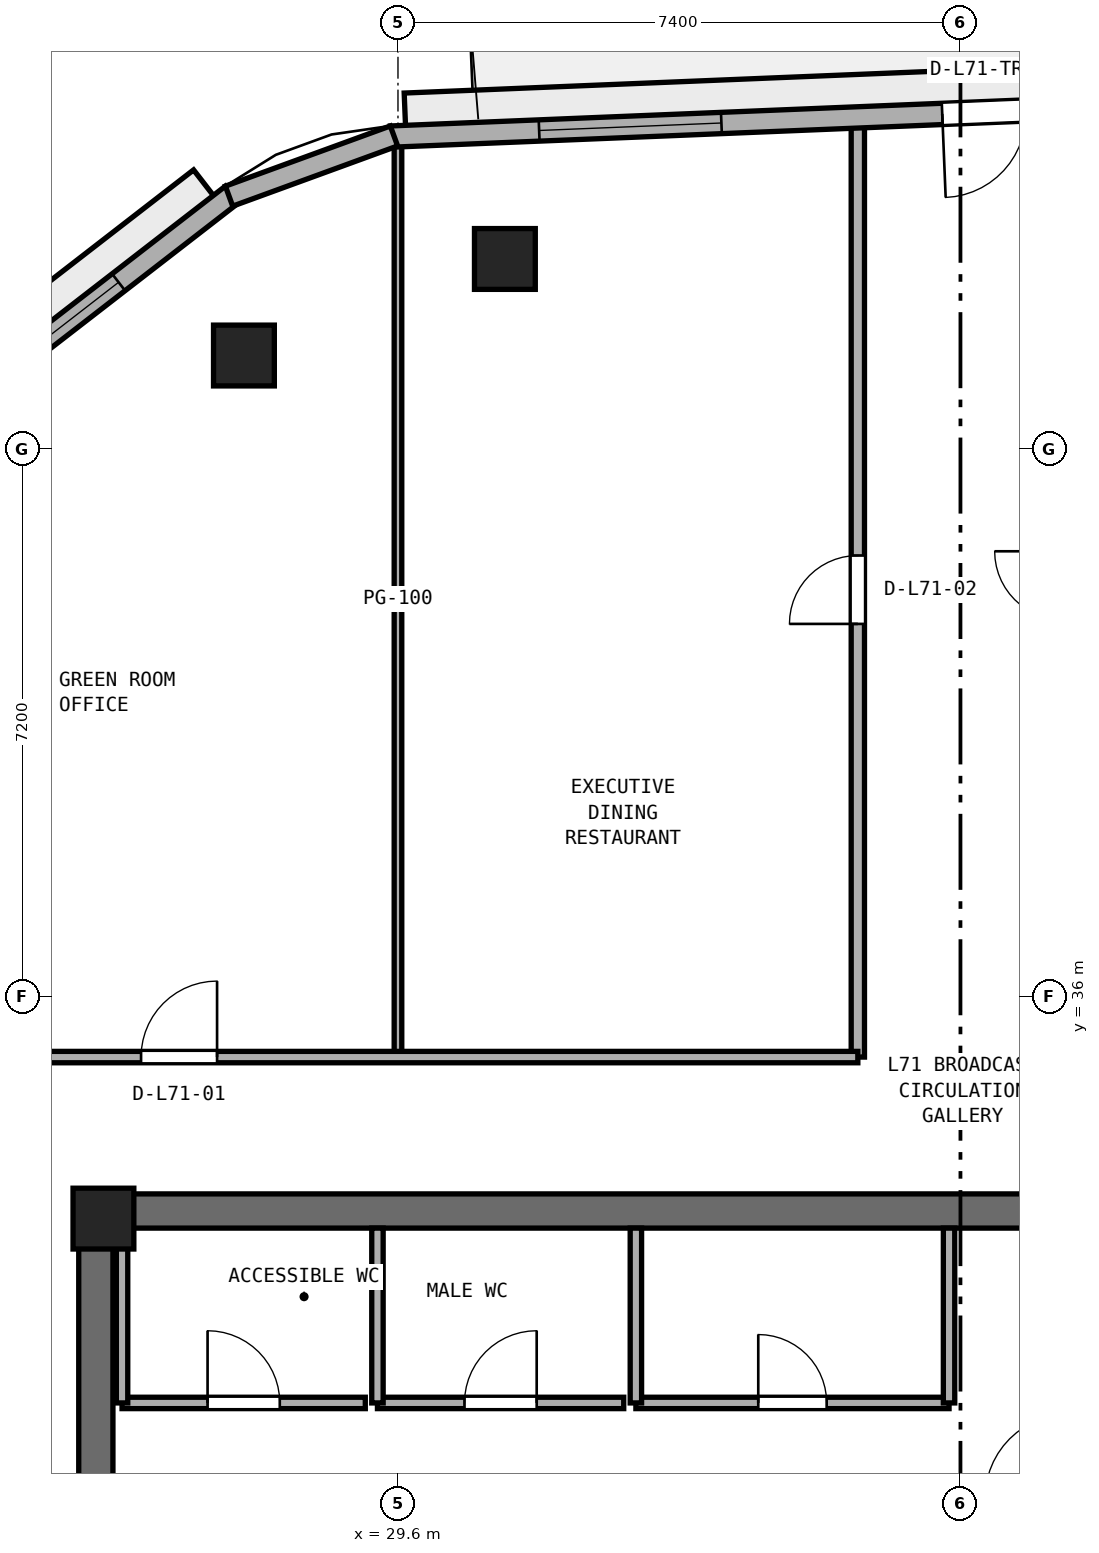
"""IFC4 building model, lengths in metres.
Left out: names, types, materials, properties, quantities, classifications, styles, units other than length and angle.
Written with IfcOpenShell. Run it as: python <this file> out.ifc"""

import sys

from ifc_helpers import new_model, si_unit, direction, frame, frame_2d, origin, origin_2d, place, context, subcontext, project, spatial, rectangle, extrude, element, fill, save


model = new_model("IFC4")
c1 = context("Model", 3, precision=1e-05, world=origin(), true_north=direction((0.0, 1.0)))
c2 = subcontext(c1, "Body", "Model", "MODEL_VIEW")
j1 = project(units=[si_unit("LENGTHUNIT", "METRE"), si_unit("PLANEANGLEUNIT", "RADIAN")], contexts=[c1])
p1 = place(None, origin())
s1 = spatial("IfcSite", under=j1, at=p1, CompositionType="ELEMENT")
p2 = place(p1, origin())
s2 = spatial("IfcBuilding", under=s1, at=p2, CompositionType="ELEMENT")
p3 = place(p2, frame((0.0, 0.0, 278.2)))
s3 = spatial("IfcBuildingStorey", under=s2, at=p3, CompositionType="ELEMENT", Elevation=278.2)
p4 = place(p3, frame((25.4, 33.175, 0.0), z_axis=(0.0, 0.0, 1.0), x_axis=(1.0, 0.0, 0.0)))
e1 = element("IfcWall", 1, at=p4, inside=s3, PredefinedType="SHEAR", context=c2, shape_type="SweptSolid", body=[
    extrude(rectangle(XDim=23.2, YDim=0.45, at=frame_2d((11.6, 0.0))), origin(), (0.0, 0.0, 1.0), 3.54),
])
p5 = place(p3, frame((25.625, 17.45, 0.0), z_axis=(0.0, 0.0, 1.0), x_axis=(0.0, 1.0, 0.0)))
e2 = element("IfcWall", 2, at=p5, inside=s3, PredefinedType="SHEAR", context=c2, shape_type="SweptSolid", body=[
    extrude(rectangle(XDim=15.5, YDim=0.45, at=frame_2d((7.75, 0.0))), origin(), (0.0, 0.0, 1.0), 3.54),
])
p6 = place(p5, frame((7.0, 0.0, 0.0)))
e3 = element("IfcOpeningElement", 3, at=p6, cuts=e2, PredefinedType="OPENING", context=c2, shape_type="SweptSolid", body=[
    extrude(rectangle(XDim=1.5, YDim=2.15, at=frame_2d((0.75, 1.075))), frame((0.0, 0.235, 0.0), z_axis=(0.0, -1.0, 0.0), x_axis=(1.0, 0.0, 0.0)), (0.0, 0.0, 1.0), 0.47),
])
p7 = place(p3, frame((25.725, 33.075, 0.0), z_axis=(0.0, 0.0, 1.0), x_axis=(1.0, 0.0, 0.0)))
e4 = element("IfcColumn", 4, at=p7, inside=s3, PredefinedType="PILASTER", context=c2, shape_type="SweptSolid", body=[
    extrude(rectangle(XDim=0.8, YDim=0.8, at=origin_2d()), origin(), (0.0, 0.0, 1.0), 3.8),
])
for number, where, z_axis, x_axis in (
    (5, (31.007, 45.7, 0.0), (0.0, 0.0, 1.0), (1.0, 0.0, 0.0)),
    (6, (27.573, 44.43, 0.0), (0.0, 0.0, 1.0), (1.0, 0.0, 0.0)),
):
    element("IfcColumn", number, at=place(p3, frame(where, z_axis=z_axis, x_axis=x_axis)), inside=s3, PredefinedType="COLUMN", context=c2, shape_type="SweptSolid", body=[
        extrude(rectangle(XDim=0.8, YDim=0.8, at=origin_2d()), origin(), (0.0, 0.0, 1.0), 3.8),
    ])
p8 = place(p3, frame((25.97, 30.65, 0.0), z_axis=(0.0, 0.0, 1.0), x_axis=(1.0, 0.0, 0.0)))
e7 = element("IfcWall", 7, at=p8, inside=s3, PredefinedType="PARTITIONING", context=c2, shape_type="SweptSolid", body=[
    extrude(rectangle(XDim=3.2, YDim=0.15, at=frame_2d((1.6, 0.0))), origin(), (0.0, 0.0, 1.0), 3.54),
])
p9 = place(p8, frame((1.125, 0.0, 0.0)))
e8 = element("IfcOpeningElement", 8, at=p9, cuts=e7, PredefinedType="OPENING", context=c2, shape_type="SweptSolid", body=[
    extrude(rectangle(XDim=0.95, YDim=2.1, at=frame_2d((0.475, 1.05))), frame((0.0, 0.085, 0.0), z_axis=(0.0, -1.0, 0.0), x_axis=(1.0, 0.0, 0.0)), (0.0, 0.0, 1.0), 0.17),
])
p10 = place(p3, frame((25.97, 30.65, 0.0), z_axis=(0.0, 0.0, 1.0), x_axis=(0.0, 1.0, 0.0)))
e9 = element("IfcWall", 9, at=p10, inside=s3, PredefinedType="PARTITIONING", context=c2, shape_type="SweptSolid", body=[
    extrude(rectangle(XDim=2.3, YDim=0.15, at=frame_2d((1.15, 0.0))), origin(), (0.0, 0.0, 1.0), 2.64),
])
p11 = place(p3, frame((29.33, 30.65, 0.0), z_axis=(0.0, 0.0, 1.0), x_axis=(1.0, 0.0, 0.0)))
e10 = element("IfcWall", 10, at=p11, inside=s3, PredefinedType="PARTITIONING", context=c2, shape_type="SweptSolid", body=[
    extrude(rectangle(XDim=3.24, YDim=0.15, at=frame_2d((1.62, 0.0))), origin(), (0.0, 0.0, 1.0), 3.54),
])
p12 = place(p11, frame((1.145, 0.0, 0.0)))
e11 = element("IfcOpeningElement", 11, at=p12, cuts=e10, PredefinedType="OPENING", context=c2, shape_type="SweptSolid", body=[
    extrude(rectangle(XDim=0.95, YDim=2.1, at=frame_2d((0.475, 1.05))), frame((0.0, 0.085, 0.0), z_axis=(0.0, -1.0, 0.0), x_axis=(1.0, 0.0, 0.0)), (0.0, 0.0, 1.0), 0.17),
])
p13 = place(p3, frame((29.33, 30.65, 0.0), z_axis=(0.0, 0.0, 1.0), x_axis=(0.0, 1.0, 0.0)))
e12 = element("IfcWall", 12, at=p13, inside=s3, PredefinedType="PARTITIONING", context=c2, shape_type="SweptSolid", body=[
    extrude(rectangle(XDim=2.3, YDim=0.15, at=frame_2d((1.15, 0.0))), origin(), (0.0, 0.0, 1.0), 3.54),
])
p14 = place(p3, frame((32.73, 30.65, 0.0), z_axis=(0.0, 0.0, 1.0), x_axis=(1.0, 0.0, 0.0)))
e13 = element("IfcWall", 13, at=p14, inside=s3, PredefinedType="PARTITIONING", context=c2, shape_type="SweptSolid", body=[
    extrude(rectangle(XDim=4.12, YDim=0.15, at=frame_2d((2.06, 0.0))), origin(), (0.0, 0.0, 1.0), 3.54),
])
p15 = place(p14, frame((1.61, 0.0, 0.0)))
e14 = element("IfcOpeningElement", 14, at=p15, cuts=e13, PredefinedType="OPENING", context=c2, shape_type="SweptSolid", body=[
    extrude(rectangle(XDim=0.9, YDim=2.1, at=frame_2d((0.45, 1.05))), frame((0.0, 0.085, 0.0), z_axis=(0.0, -1.0, 0.0), x_axis=(1.0, 0.0, 0.0)), (0.0, 0.0, 1.0), 0.17),
])
for number, where, z_axis, x_axis in (
    (15, (32.73, 30.65, 0.0), (0.0, 0.0, 1.0), (0.0, 1.0, 0.0)),
    (16, (36.85, 30.65, 0.0), (0.0, 0.0, 1.0), (0.0, 1.0, 0.0)),
):
    element("IfcWall", number, at=place(p3, frame(where, z_axis=z_axis, x_axis=x_axis)), inside=s3, PredefinedType="PARTITIONING", context=c2, shape_type="SweptSolid", body=[
        extrude(rectangle(XDim=2.3, YDim=0.15, at=frame_2d((1.15, 0.0))), origin(), (0.0, 0.0, 1.0), 3.54),
    ])
p16 = place(p3, frame((35.65, 35.2, 0.0), z_axis=(0.0, 0.0, 1.0), x_axis=(0.0, 1.0, 0.0)))
e17 = element("IfcWall", 17, at=p16, inside=s3, PredefinedType="PARTITIONING", context=c2, shape_type="SweptSolid", body=[
    extrude(rectangle(XDim=12.298, YDim=0.175, at=frame_2d((6.149, 0.0))), origin(), (0.0, 0.0, 1.0), 3.54),
])
p17 = place(p16, frame((5.699, 0.0, 0.0)))
e18 = element("IfcOpeningElement", 18, at=p17, cuts=e17, PredefinedType="OPENING", context=c2, shape_type="SweptSolid", body=[
    extrude(rectangle(XDim=0.9, YDim=2.1, at=frame_2d((0.45, 1.05))), frame((0.0, 0.097, 0.0), z_axis=(0.0, -1.0, 0.0), x_axis=(1.0, 0.0, 0.0)), (0.0, 0.0, 1.0), 0.195),
])
p18 = place(p3, frame((29.6, 35.2, 0.0), z_axis=(0.0, 0.0, 1.0), x_axis=(0.0, 1.0, 0.0)))
e19 = element("IfcWall", 19, at=p18, inside=s3, PredefinedType="PARTITIONING", context=c2, shape_type="SweptSolid", body=[
    extrude(rectangle(XDim=12.049, YDim=0.1, at=frame_2d((6.024, 0.0))), origin(), (0.0, 0.0, 1.0), 3.54),
])
p19 = place(p3, frame((23.6, 35.2, 0.0), z_axis=(0.0, 0.0, 1.0), x_axis=(1.0, 0.0, 0.0)))
e20 = element("IfcWall", 20, at=p19, inside=s3, PredefinedType="PARTITIONING", context=c2, shape_type="SweptSolid", body=[
    extrude(rectangle(XDim=12.05, YDim=0.15, at=frame_2d((6.025, 0.0))), origin(), (0.0, 0.0, 1.0), 3.54),
])
p20 = place(p19, frame((2.62, 0.0, 0.0)))
e21 = element("IfcOpeningElement", 21, at=p20, cuts=e20, PredefinedType="OPENING", context=c2, shape_type="SweptSolid", body=[
    extrude(rectangle(XDim=1.0, YDim=2.12, at=frame_2d((0.5, 1.06))), frame((0.0, 0.085, 0.0), z_axis=(0.0, -1.0, 0.0), x_axis=(1.0, 0.0, 0.0)), (0.0, 0.0, 1.0), 0.17),
])
p21 = place(p3, frame((46.414, 48.005, 0.0), z_axis=(0.0, 0.0, 1.0), x_axis=(-0.999156194126, -0.041071885021, 0.0)))
e22 = element("IfcWall", 22, at=p21, inside=s3, PredefinedType="STANDARD", context=c2, shape_type="SweptSolid", body=[
    extrude(rectangle(XDim=16.923, YDim=0.28, at=frame_2d((8.461, 0.0))), origin(), (0.0, 0.0, 1.0), 3.54),
])
p22 = place(p21, frame((8.562, 0.0, 0.0)))
e23 = element("IfcOpeningElement", 23, at=p22, cuts=e22, PredefinedType="OPENING", context=c2, shape_type="SweptSolid", body=[
    extrude(rectangle(XDim=1.1, YDim=2.2, at=frame_2d((0.55, 1.1))), frame((0.0, 0.15, 0.0), z_axis=(0.0, -1.0, 0.0), x_axis=(1.0, 0.0, 0.0)), (0.0, 0.0, 1.0), 0.3),
])
p23 = place(p21, frame((1.954, 0.0, 0.9)))
e24 = element("IfcOpeningElement", 24, at=p23, cuts=e22, PredefinedType="OPENING", context=c2, shape_type="SweptSolid", body=[
    extrude(rectangle(XDim=2.4, YDim=1.75, at=frame_2d((1.2, 0.875))), frame((0.0, 0.15, 0.0), z_axis=(0.0, -1.0, 0.0), x_axis=(1.0, 0.0, 0.0)), (0.0, 0.0, 1.0), 0.3),
])
p24 = place(p21, frame((12.569, 0.0, 0.9)))
e25 = element("IfcOpeningElement", 25, at=p24, cuts=e22, PredefinedType="OPENING", context=c2, shape_type="SweptSolid", body=[
    extrude(rectangle(XDim=2.4, YDim=1.75, at=frame_2d((1.2, 0.875))), frame((0.0, 0.15, 0.0), z_axis=(0.0, -1.0, 0.0), x_axis=(1.0, 0.0, 0.0)), (0.0, 0.0, 1.0), 0.3),
])
p25 = place(p3, frame((27.415, 46.547, 0.0), z_axis=(0.0, 0.0, 1.0), x_axis=(-0.790789745248, -0.612087884875, 0.0)))
e26 = element("IfcWall", 26, at=p25, inside=s3, PredefinedType="STANDARD", context=c2, shape_type="SweptSolid", body=[
    extrude(rectangle(XDim=16.509, YDim=0.28, at=frame_2d((8.254, 0.0))), origin(), (0.0, 0.0, 1.0), 3.54),
])
p26 = place(p25, frame((1.885, 0.0, 0.9)))
e27 = element("IfcOpeningElement", 27, at=p26, cuts=e26, PredefinedType="OPENING", context=c2, shape_type="SweptSolid", body=[
    extrude(rectangle(XDim=2.4, YDim=1.75, at=frame_2d((1.2, 0.875))), frame((0.0, 0.15, 0.0), z_axis=(0.0, -1.0, 0.0), x_axis=(1.0, 0.0, 0.0)), (0.0, 0.0, 1.0), 0.3),
])
p27 = place(p25, frame((7.055, 0.0, 0.9)))
e28 = element("IfcOpeningElement", 28, at=p27, cuts=e26, PredefinedType="OPENING", context=c2, shape_type="SweptSolid", body=[
    extrude(rectangle(XDim=2.4, YDim=1.75, at=frame_2d((1.2, 0.875))), frame((0.0, 0.15, 0.0), z_axis=(0.0, -1.0, 0.0), x_axis=(1.0, 0.0, 0.0)), (0.0, 0.0, 1.0), 0.3),
])
p28 = place(p25, frame((12.224, 0.0, 0.9)))
e29 = element("IfcOpeningElement", 29, at=p28, cuts=e26, PredefinedType="OPENING", context=c2, shape_type="SweptSolid", body=[
    extrude(rectangle(XDim=2.4, YDim=1.75, at=frame_2d((1.2, 0.875))), frame((0.0, 0.15, 0.0), z_axis=(0.0, -1.0, 0.0), x_axis=(1.0, 0.0, 0.0)), (0.0, 0.0, 1.0), 0.3),
])
p29 = place(p3, frame((29.547, 47.318, 0.0), z_axis=(0.0, 0.0, 1.0), x_axis=(-0.93940703724, -0.342803760748, 0.0)))
e30 = element("IfcWall", 30, at=p29, inside=s3, PredefinedType="STANDARD", context=c2, shape_type="SweptSolid", body=[
    extrude(rectangle(XDim=2.31, YDim=0.28, at=frame_2d((1.155, 0.0))), origin(), (0.0, 0.0, 1.0), 3.54),
])
p30 = place(p9, origin())
e31 = element("IfcDoor", 31, at=p30, inside=s3, OperationType="SINGLE_SWING_LEFT", PredefinedType="DOOR", context=c2, shape_type="SweptSolid", body=[
    extrude(rectangle(XDim=0.95, YDim=2.1, at=frame_2d((0.475, 1.05))), frame((0.0, 0.025, 0.0), z_axis=(0.0, -1.0, 0.0), x_axis=(1.0, 0.0, 0.0)), (0.0, 0.0, 1.0), 0.05),
])
fill(e8, e31)
p31 = place(p12, origin())
e32 = element("IfcDoor", 32, at=p31, inside=s3, OperationType="SINGLE_SWING_RIGHT", PredefinedType="DOOR", context=c2, shape_type="SweptSolid", body=[
    extrude(rectangle(XDim=0.95, YDim=2.1, at=frame_2d((0.475, 1.05))), frame((0.0, 0.025, 0.0), z_axis=(0.0, -1.0, 0.0), x_axis=(1.0, 0.0, 0.0)), (0.0, 0.0, 1.0), 0.05),
])
fill(e11, e32)
p32 = place(p15, origin())
e33 = element("IfcDoor", 33, at=p32, inside=s3, OperationType="SINGLE_SWING_LEFT", PredefinedType="DOOR", context=c2, shape_type="SweptSolid", body=[
    extrude(rectangle(XDim=0.9, YDim=2.1, at=frame_2d((0.45, 1.05))), frame((0.0, 0.025, 0.0), z_axis=(0.0, -1.0, 0.0), x_axis=(1.0, 0.0, 0.0)), (0.0, 0.0, 1.0), 0.05),
])
fill(e14, e33)
p33 = place(p20, origin())
e34 = element("IfcDoor", 34, at=p33, inside=s3, OperationType="SINGLE_SWING_RIGHT", PredefinedType="DOOR", context=c2, shape_type="SweptSolid", body=[
    extrude(rectangle(XDim=1.0, YDim=2.12, at=frame_2d((0.5, 1.06))), frame((0.0, 0.025, 0.0), z_axis=(0.0, -1.0, 0.0), x_axis=(1.0, 0.0, 0.0)), (0.0, 0.0, 1.0), 0.05),
])
fill(e21, e34)
p34 = place(p17, origin())
e35 = element("IfcDoor", 35, at=p34, inside=s3, OperationType="SINGLE_SWING_LEFT", PredefinedType="DOOR", context=c2, shape_type="SweptSolid", body=[
    extrude(rectangle(XDim=0.9, YDim=2.1, at=frame_2d((0.45, 1.05))), frame((0.0, 0.025, 0.0), z_axis=(0.0, -1.0, 0.0), x_axis=(1.0, 0.0, 0.0)), (0.0, 0.0, 1.0), 0.05),
])
fill(e18, e35)
p35 = place(p22, origin())
e36 = element("IfcDoor", 36, at=p35, inside=s3, OperationType="SINGLE_SWING_RIGHT", PredefinedType="DOOR", context=c2, shape_type="SweptSolid", body=[
    extrude(rectangle(XDim=1.1, YDim=2.2, at=frame_2d((0.55, 1.1))), frame((0.0, 0.025, 0.0), z_axis=(0.0, -1.0, 0.0), x_axis=(1.0, 0.0, 0.0)), (0.0, 0.0, 1.0), 0.05),
])
fill(e23, e36)
p36 = place(p24, origin())
e37 = element("IfcWindow", 37, at=p36, inside=s3, PartitioningType="SINGLE_PANEL", PredefinedType="WINDOW", context=c2, shape_type="SweptSolid", body=[
    extrude(rectangle(XDim=2.4, YDim=1.75, at=frame_2d((1.2, 0.875))), frame((0.0, 0.03, 0.0), z_axis=(0.0, -1.0, 0.0), x_axis=(1.0, 0.0, 0.0)), (0.0, 0.0, 1.0), 0.06),
])
fill(e25, e37)
p37 = place(p26, origin())
e38 = element("IfcWindow", 38, at=p37, inside=s3, PartitioningType="SINGLE_PANEL", PredefinedType="WINDOW", context=c2, shape_type="SweptSolid", body=[
    extrude(rectangle(XDim=2.4, YDim=1.75, at=frame_2d((1.2, 0.875))), frame((0.0, 0.03, 0.0), z_axis=(0.0, -1.0, 0.0), x_axis=(1.0, 0.0, 0.0)), (0.0, 0.0, 1.0), 0.06),
])
fill(e27, e38)
save(model, sys.argv[1])
